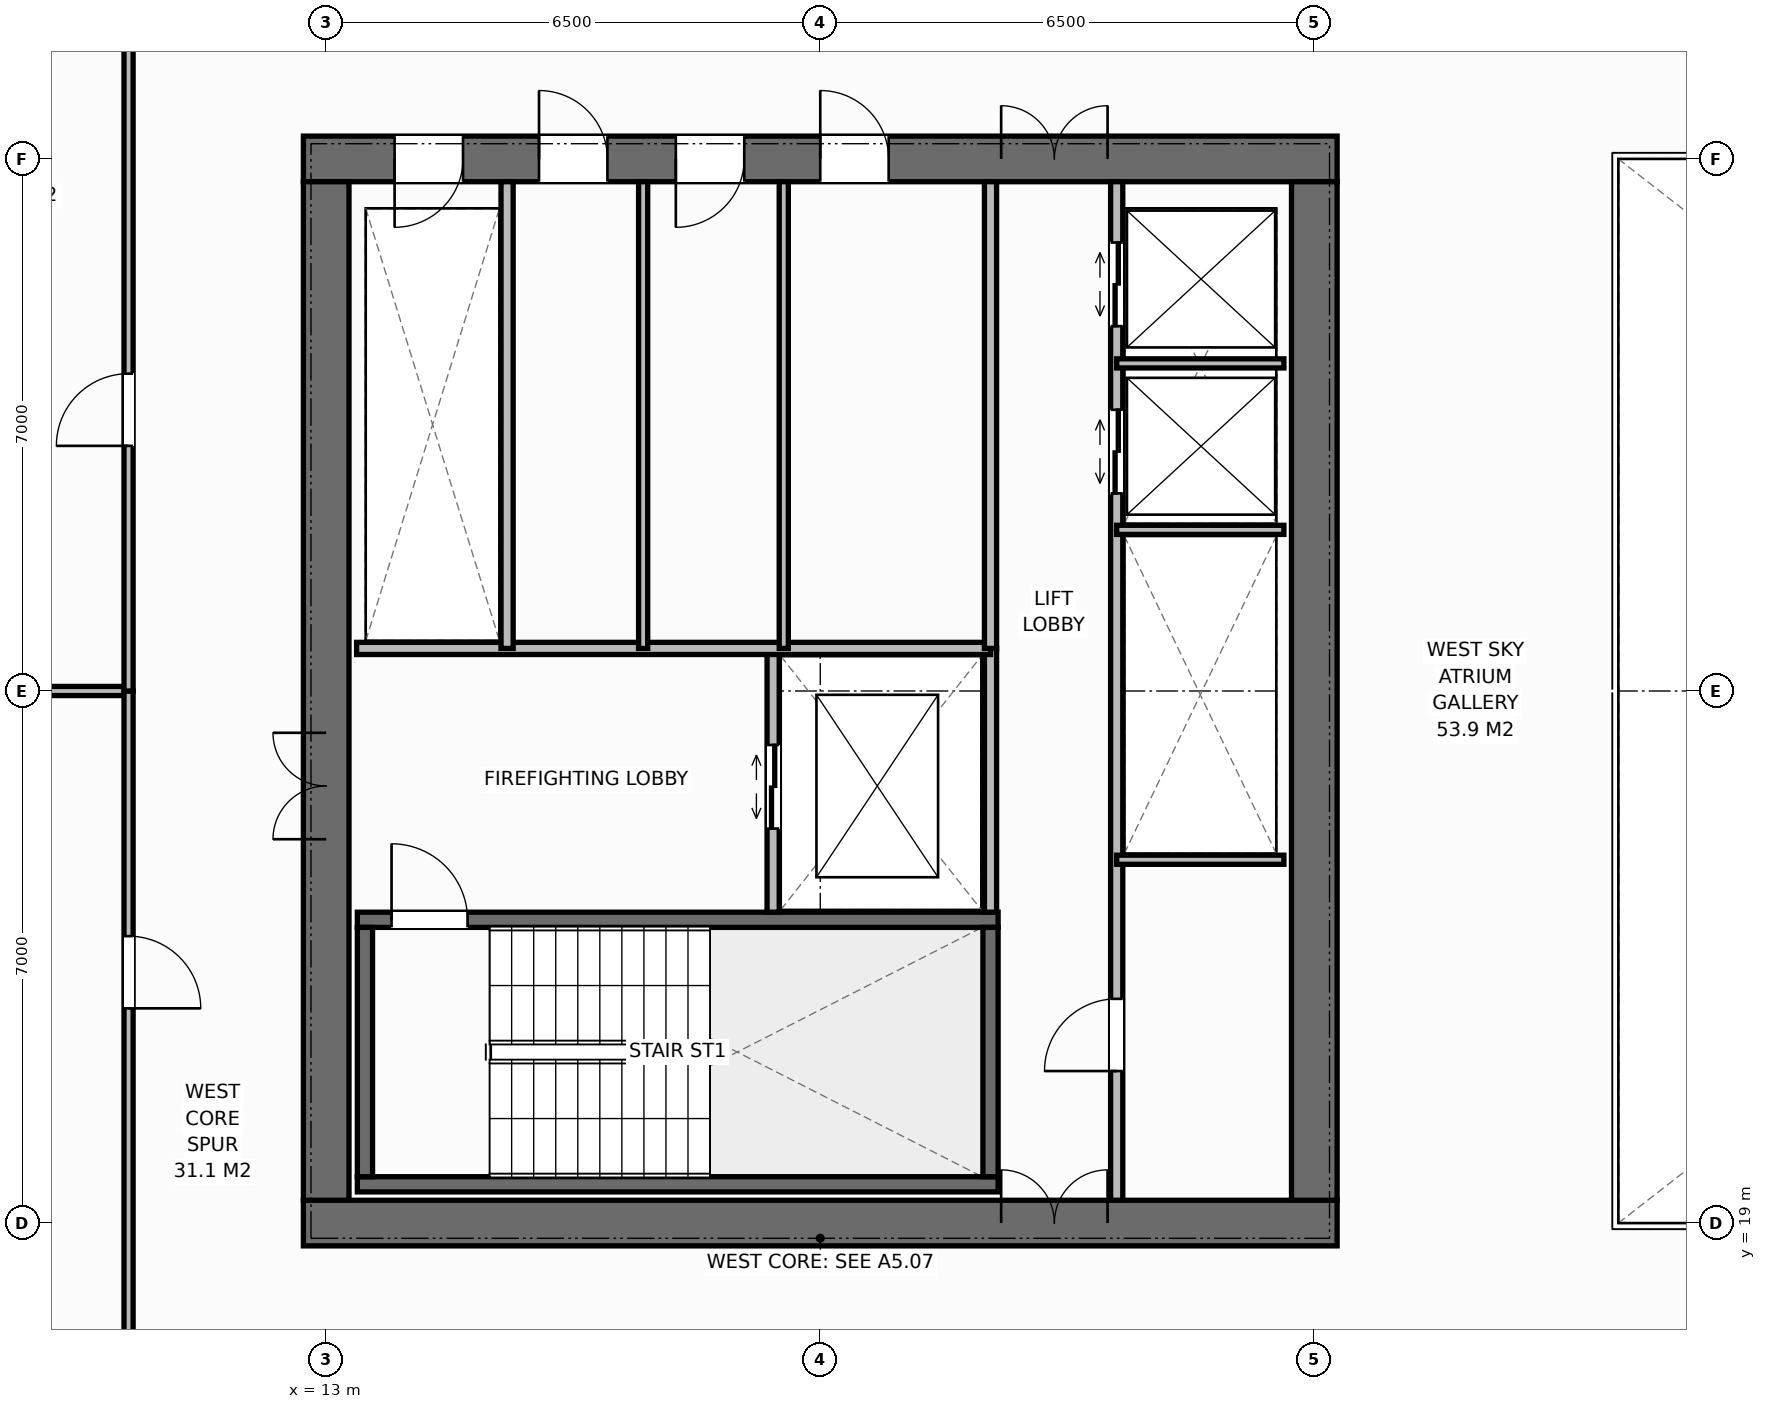
"""IFC4 building model, lengths in metres.
Left out: names, types, materials, properties, quantities, classifications, styles, units other than length and angle.
Written with IfcOpenShell. Run it as: python <this file> out.ifc"""

import sys

from ifc_helpers import new_model, si_unit, direction, frame, frame_2d, origin, place, context, subcontext, project, spatial, rectangle, extrude, element, fill, save


model = new_model("IFC4")
c1 = context("Model", 3, precision=1e-05, world=origin(), true_north=direction((0.0, 1.0)))
c2 = subcontext(c1, "Body", "Model", "MODEL_VIEW")
j1 = project(units=[si_unit("LENGTHUNIT", "METRE"), si_unit("PLANEANGLEUNIT", "RADIAN")], contexts=[c1])
p1 = place(None, origin())
s1 = spatial("IfcSite", under=j1, at=p1, CompositionType="ELEMENT")
p2 = place(p1, origin())
s2 = spatial("IfcBuilding", under=s1, at=p2, CompositionType="ELEMENT")
p3 = place(p2, frame((0.0, 0.0, 148.0)))
s3 = spatial("IfcBuildingStorey", under=s2, at=p3, CompositionType="ELEMENT", Elevation=148.0)
p4 = place(p3, frame((12.7, 19.0, 0.0), z_axis=(0.0, 0.0, 1.0), x_axis=(1.0, 0.0, 0.0)))
e1 = element("IfcWall", 1, at=p4, inside=s3, PredefinedType="SHEAR", context=c2, shape_type="SweptSolid", body=[
    extrude(rectangle(XDim=13.6, YDim=0.6, at=frame_2d((6.8, 0.0))), origin(), (0.0, 0.0, 1.0), 3.8),
])
p5 = place(p4, frame((9.18, 0.0, 0.0)))
e2 = element("IfcOpeningElement", 2, at=p5, cuts=e1, PredefinedType="OPENING", context=c2, shape_type="SweptSolid", body=[
    extrude(rectangle(XDim=1.4, YDim=2.2, at=frame_2d((0.7, 1.1))), frame((0.0, 0.31, 0.0), z_axis=(0.0, -1.0, 0.0), x_axis=(1.0, 0.0, 0.0)), (0.0, 0.0, 1.0), 0.62),
])
p6 = place(p3, frame((12.7, 33.0, 0.0), z_axis=(0.0, 0.0, 1.0), x_axis=(1.0, 0.0, 0.0)))
e3 = element("IfcWall", 3, at=p6, inside=s3, PredefinedType="SHEAR", context=c2, shape_type="SweptSolid", body=[
    extrude(rectangle(XDim=13.6, YDim=0.6, at=frame_2d((6.8, 0.0))), origin(), (0.0, 0.0, 1.0), 3.8),
])
p7 = place(p6, frame((1.2, 0.0, 0.0)))
e4 = element("IfcOpeningElement", 4, at=p7, cuts=e3, PredefinedType="OPENING", context=c2, shape_type="SweptSolid", body=[
    extrude(rectangle(XDim=0.9, YDim=2.15, at=frame_2d((0.45, 1.075))), frame((0.0, 0.31, 0.0), z_axis=(0.0, -1.0, 0.0), x_axis=(1.0, 0.0, 0.0)), (0.0, 0.0, 1.0), 0.62),
])
p8 = place(p6, frame((3.1, 0.0, 0.0)))
e5 = element("IfcOpeningElement", 5, at=p8, cuts=e3, PredefinedType="OPENING", context=c2, shape_type="SweptSolid", body=[
    extrude(rectangle(XDim=0.9, YDim=2.15, at=frame_2d((0.45, 1.075))), frame((0.0, 0.31, 0.0), z_axis=(0.0, -1.0, 0.0), x_axis=(1.0, 0.0, 0.0)), (0.0, 0.0, 1.0), 0.62),
])
p9 = place(p6, frame((4.9, 0.0, 0.0)))
e6 = element("IfcOpeningElement", 6, at=p9, cuts=e3, PredefinedType="OPENING", context=c2, shape_type="SweptSolid", body=[
    extrude(rectangle(XDim=0.9, YDim=2.15, at=frame_2d((0.45, 1.075))), frame((0.0, 0.31, 0.0), z_axis=(0.0, -1.0, 0.0), x_axis=(1.0, 0.0, 0.0)), (0.0, 0.0, 1.0), 0.62),
])
p10 = place(p6, frame((6.8, 0.0, 0.0)))
e7 = element("IfcOpeningElement", 7, at=p10, cuts=e3, PredefinedType="OPENING", context=c2, shape_type="SweptSolid", body=[
    extrude(rectangle(XDim=0.9, YDim=2.15, at=frame_2d((0.45, 1.075))), frame((0.0, 0.31, 0.0), z_axis=(0.0, -1.0, 0.0), x_axis=(1.0, 0.0, 0.0)), (0.0, 0.0, 1.0), 0.62),
])
p11 = place(p6, frame((9.18, 0.0, 0.0)))
e8 = element("IfcOpeningElement", 8, at=p11, cuts=e3, PredefinedType="OPENING", context=c2, shape_type="SweptSolid", body=[
    extrude(rectangle(XDim=1.4, YDim=2.2, at=frame_2d((0.7, 1.1))), frame((0.0, 0.31, 0.0), z_axis=(0.0, -1.0, 0.0), x_axis=(1.0, 0.0, 0.0)), (0.0, 0.0, 1.0), 0.62),
])
p12 = place(p3, frame((13.0, 19.3, 0.0), z_axis=(0.0, 0.0, 1.0), x_axis=(0.0, 1.0, 0.0)))
e9 = element("IfcWall", 9, at=p12, inside=s3, PredefinedType="SHEAR", context=c2, shape_type="SweptSolid", body=[
    extrude(rectangle(XDim=13.4, YDim=0.6, at=frame_2d((6.7, 0.0))), origin(), (0.0, 0.0, 1.0), 3.8),
])
p13 = place(p12, frame((4.75, 0.0, 0.0)))
e10 = element("IfcOpeningElement", 10, at=p13, cuts=e9, PredefinedType="OPENING", context=c2, shape_type="SweptSolid", body=[
    extrude(rectangle(XDim=1.4, YDim=2.2, at=frame_2d((0.7, 1.1))), frame((0.0, 0.31, 0.0), z_axis=(0.0, -1.0, 0.0), x_axis=(1.0, 0.0, 0.0)), (0.0, 0.0, 1.0), 0.62),
])
p14 = place(p3, frame((26.0, 19.3, 0.0), z_axis=(0.0, 0.0, 1.0), x_axis=(0.0, 1.0, 0.0)))
e11 = element("IfcWall", 11, at=p14, inside=s3, PredefinedType="SHEAR", context=c2, shape_type="SweptSolid", body=[
    extrude(rectangle(XDim=13.4, YDim=0.6, at=frame_2d((6.7, 0.0))), origin(), (0.0, 0.0, 1.0), 3.8),
])
p15 = place(p3, frame((13.41, 19.51, 0.0), z_axis=(0.0, 0.0, 1.0), x_axis=(1.0, 0.0, 0.0)))
e12 = element("IfcWall", 12, at=p15, inside=s3, PredefinedType="SHEAR", context=c2, shape_type="SweptSolid", body=[
    extrude(rectangle(XDim=8.43, YDim=0.2, at=frame_2d((4.215, 0.0))), origin(), (0.0, 0.0, 1.0), 3.8),
])
p16 = place(p3, frame((13.41, 22.99, 0.0), z_axis=(0.0, 0.0, 1.0), x_axis=(1.0, 0.0, 0.0)))
e13 = element("IfcWall", 13, at=p16, inside=s3, PredefinedType="SHEAR", context=c2, shape_type="SweptSolid", body=[
    extrude(rectangle(XDim=8.43, YDim=0.2, at=frame_2d((4.215, 0.0))), origin(), (0.0, 0.0, 1.0), 3.8),
])
p17 = place(p16, frame((0.45, 0.0, 0.0)))
e14 = element("IfcOpeningElement", 14, at=p17, cuts=e13, PredefinedType="OPENING", context=c2, shape_type="SweptSolid", body=[
    extrude(rectangle(XDim=1.0, YDim=2.15, at=frame_2d((0.5, 1.075))), frame((0.0, 0.11, 0.0), z_axis=(0.0, -1.0, 0.0), x_axis=(1.0, 0.0, 0.0)), (0.0, 0.0, 1.0), 0.22),
])
for number, where, z_axis, x_axis in (
    (15, (13.51, 19.61, 0.0), (0.0, 0.0, 1.0), (0.0, 1.0, 0.0)),
    (16, (21.74, 19.61, 0.0), (0.0, 0.0, 1.0), (0.0, 1.0, 0.0)),
):
    element("IfcWall", number, at=place(p3, frame(where, z_axis=z_axis, x_axis=x_axis)), inside=s3, PredefinedType="SHEAR", context=c2, shape_type="SweptSolid", body=[
        extrude(rectangle(XDim=3.28, YDim=0.2, at=frame_2d((1.64, 0.0))), origin(), (0.0, 0.0, 1.0), 3.8),
    ])
p18 = place(p3, frame((21.74, 23.09, 0.0), z_axis=(0.0, 0.0, 1.0), x_axis=(0.0, 1.0, 0.0)))
e17 = element("IfcWall", 17, at=p18, inside=s3, PredefinedType="STANDARD", context=c2, shape_type="SweptSolid", body=[
    extrude(rectangle(XDim=3.47, YDim=0.16, at=frame_2d((1.735, 0.0))), origin(), (0.0, 0.0, 1.0), 3.572),
])
p19 = place(p3, frame((18.88, 23.09, 0.0), z_axis=(0.0, 0.0, 1.0), x_axis=(0.0, 1.0, 0.0)))
e18 = element("IfcWall", 18, at=p19, inside=s3, PredefinedType="STANDARD", context=c2, shape_type="SweptSolid", body=[
    extrude(rectangle(XDim=3.47, YDim=0.16, at=frame_2d((1.735, 0.0))), origin(), (0.0, 0.0, 1.0), 3.572),
])
p20 = place(p19, frame((1.1, 0.0, 0.0)))
e19 = element("IfcOpeningElement", 19, at=p20, cuts=e18, PredefinedType="OPENING", context=c2, shape_type="SweptSolid", body=[
    extrude(rectangle(XDim=1.1, YDim=2.2, at=frame_2d((0.55, 1.1))), frame((0.0, 0.09, 0.0), z_axis=(0.0, -1.0, 0.0), x_axis=(1.0, 0.0, 0.0)), (0.0, 0.0, 1.0), 0.18),
])
p21 = place(p3, frame((13.4, 26.56, 0.0), z_axis=(0.0, 0.0, 1.0), x_axis=(1.0, 0.0, 0.0)))
e20 = element("IfcWall", 20, at=p21, inside=s3, PredefinedType="STANDARD", context=c2, shape_type="SweptSolid", body=[
    extrude(rectangle(XDim=8.34, YDim=0.16, at=frame_2d((4.17, 0.0))), origin(), (0.0, 0.0, 1.0), 3.572),
])
p22 = place(p3, frame((15.38, 26.56, 0.0), z_axis=(0.0, 0.0, 1.0), x_axis=(0.0, 1.0, 0.0)))
e21 = element("IfcWall", 21, at=p22, inside=s3, PredefinedType="STANDARD", context=c2, shape_type="SweptSolid", body=[
    extrude(rectangle(XDim=6.14, YDim=0.16, at=frame_2d((3.07, 0.0))), origin(), (0.0, 0.0, 1.0), 3.572),
])
for number, where, z_axis, x_axis in (
    (22, (17.17, 26.56, 0.0), (0.0, 0.0, 1.0), (0.0, 1.0, 0.0)),
    (23, (19.02, 26.56, 0.0), (0.0, 0.0, 1.0), (0.0, 1.0, 0.0)),
):
    element("IfcWall", number, at=place(p3, frame(where, z_axis=z_axis, x_axis=x_axis)), inside=s3, PredefinedType="PARTITIONING", context=c2, shape_type="SweptSolid", body=[
        extrude(rectangle(XDim=6.14, YDim=0.12, at=frame_2d((3.07, 0.0))), origin(), (0.0, 0.0, 1.0), 3.572),
    ])
p23 = place(p3, frame((21.74, 26.56, 0.0), z_axis=(0.0, 0.0, 1.0), x_axis=(0.0, 1.0, 0.0)))
e24 = element("IfcWall", 24, at=p23, inside=s3, PredefinedType="STANDARD", context=c2, shape_type="SweptSolid", body=[
    extrude(rectangle(XDim=6.14, YDim=0.16, at=frame_2d((3.07, 0.0))), origin(), (0.0, 0.0, 1.0), 3.572),
])
p24 = place(p3, frame((23.4, 19.3, 0.0), z_axis=(0.0, 0.0, 1.0), x_axis=(0.0, 1.0, 0.0)))
e25 = element("IfcWall", 25, at=p24, inside=s3, PredefinedType="STANDARD", context=c2, shape_type="SweptSolid", body=[
    extrude(rectangle(XDim=13.4, YDim=0.16, at=frame_2d((6.7, 0.0))), origin(), (0.0, 0.0, 1.0), 3.572),
])
p25 = place(p24, frame((1.7, 0.0, 0.0)))
e26 = element("IfcOpeningElement", 26, at=p25, cuts=e25, PredefinedType="OPENING", context=c2, shape_type="SweptSolid", body=[
    extrude(rectangle(XDim=0.95, YDim=2.15, at=frame_2d((0.475, 1.075))), frame((0.0, 0.09, 0.0), z_axis=(0.0, -1.0, 0.0), x_axis=(1.0, 0.0, 0.0)), (0.0, 0.0, 1.0), 0.18),
])
p26 = place(p24, frame((9.3, 0.0, 0.0)))
e27 = element("IfcOpeningElement", 27, at=p26, cuts=e25, PredefinedType="OPENING", context=c2, shape_type="SweptSolid", body=[
    extrude(rectangle(XDim=1.1, YDim=2.2, at=frame_2d((0.55, 1.1))), frame((0.0, 0.09, 0.0), z_axis=(0.0, -1.0, 0.0), x_axis=(1.0, 0.0, 0.0)), (0.0, 0.0, 1.0), 0.18),
])
p27 = place(p24, frame((11.5, 0.0, 0.0)))
e28 = element("IfcOpeningElement", 28, at=p27, cuts=e25, PredefinedType="OPENING", context=c2, shape_type="SweptSolid", body=[
    extrude(rectangle(XDim=1.1, YDim=2.2, at=frame_2d((0.55, 1.1))), frame((0.0, 0.09, 0.0), z_axis=(0.0, -1.0, 0.0), x_axis=(1.0, 0.0, 0.0)), (0.0, 0.0, 1.0), 0.18),
])
for number, where, z_axis, x_axis in (
    (29, (23.4, 23.78, 0.0), (0.0, 0.0, 1.0), (1.0, 0.0, 0.0)),
    (30, (23.4, 28.12, 0.0), (0.0, 0.0, 1.0), (1.0, 0.0, 0.0)),
    (31, (23.4, 30.31, 0.0), (0.0, 0.0, 1.0), (1.0, 0.0, 0.0)),
):
    element("IfcWall", number, at=place(p3, frame(where, z_axis=z_axis, x_axis=x_axis)), inside=s3, PredefinedType="PARTITIONING", context=c2, shape_type="SweptSolid", body=[
        extrude(rectangle(XDim=2.2, YDim=0.12, at=frame_2d((1.1, 0.0))), origin(), (0.0, 0.0, 1.0), 3.572),
    ])
p28 = place(p3, frame((3.82, 26.0, 0.0), z_axis=(0.0, 0.0, 1.0), x_axis=(1.0, 0.0, 0.0)))
e32 = element("IfcWall", 32, at=p28, inside=s3, PredefinedType="PARTITIONING", context=c2, shape_type="SweptSolid", body=[
    extrude(rectangle(XDim=6.58, YDim=0.12, at=frame_2d((3.29, 0.0))), origin(), (0.0, 0.0, 1.0), 3.572),
])
p29 = place(p3, frame((10.4, 16.5, 0.0), z_axis=(0.0, 0.0, 1.0), x_axis=(0.0, 1.0, 0.0)))
e33 = element("IfcWall", 33, at=p29, inside=s3, PredefinedType="PARTITIONING", context=c2, shape_type="SweptSolid", body=[
    extrude(rectangle(XDim=9.5, YDim=0.12, at=frame_2d((4.75, 0.0))), origin(), (0.0, 0.0, 1.0), 3.572),
])
p30 = place(p29, frame((5.325, 0.0, 0.0)))
e34 = element("IfcOpeningElement", 34, at=p30, cuts=e33, PredefinedType="OPENING", context=c2, shape_type="SweptSolid", body=[
    extrude(rectangle(XDim=0.95, YDim=2.15, at=frame_2d((0.475, 1.075))), frame((0.0, 0.07, 0.0), z_axis=(0.0, -1.0, 0.0), x_axis=(1.0, 0.0, 0.0)), (0.0, 0.0, 1.0), 0.14),
])
p31 = place(p3, frame((10.4, 26.0, 0.0), z_axis=(0.0, 0.0, 1.0), x_axis=(0.0, 1.0, 0.0)))
e35 = element("IfcWall", 35, at=p31, inside=s3, PredefinedType="PARTITIONING", context=c2, shape_type="SweptSolid", body=[
    extrude(rectangle(XDim=9.5, YDim=0.12, at=frame_2d((4.75, 0.0))), origin(), (0.0, 0.0, 1.0), 3.572),
])
p32 = place(p31, frame((3.225, 0.0, 0.0)))
e36 = element("IfcOpeningElement", 36, at=p32, cuts=e35, PredefinedType="OPENING", context=c2, shape_type="SweptSolid", body=[
    extrude(rectangle(XDim=0.95, YDim=2.15, at=frame_2d((0.475, 1.075))), frame((0.0, 0.07, 0.0), z_axis=(0.0, -1.0, 0.0), x_axis=(1.0, 0.0, 0.0)), (0.0, 0.0, 1.0), 0.14),
])
p33 = place(p17, origin())
e37 = element("IfcDoor", 37, at=p33, inside=s3, OperationType="SINGLE_SWING_LEFT", PredefinedType="DOOR", context=c2, shape_type="SweptSolid", body=[
    extrude(rectangle(XDim=1.0, YDim=2.15, at=frame_2d((0.5, 1.075))), frame((0.0, 0.025, 0.0), z_axis=(0.0, -1.0, 0.0), x_axis=(1.0, 0.0, 0.0)), (0.0, 0.0, 1.0), 0.05),
])
fill(e14, e37)
p34 = place(p13, origin())
e38 = element("IfcDoor", 38, at=p34, inside=s3, OperationType="DOUBLE_DOOR_SINGLE_SWING", PredefinedType="DOOR", context=c2, shape_type="SweptSolid", body=[
    extrude(rectangle(XDim=1.4, YDim=2.2, at=frame_2d((0.7, 1.1))), frame((0.0, 0.025, 0.0), z_axis=(0.0, -1.0, 0.0), x_axis=(1.0, 0.0, 0.0)), (0.0, 0.0, 1.0), 0.05),
])
fill(e10, e38)
p35 = place(p20, origin())
e39 = element("IfcDoor", 39, at=p35, inside=s3, OperationType="DOUBLE_DOOR_SLIDING", PredefinedType="DOOR", context=c2, shape_type="SweptSolid", body=[
    extrude(rectangle(XDim=1.1, YDim=2.2, at=frame_2d((0.55, 1.1))), frame((0.0, 0.025, 0.0), z_axis=(0.0, -1.0, 0.0), x_axis=(1.0, 0.0, 0.0)), (0.0, 0.0, 1.0), 0.05),
])
fill(e19, e39)
p36 = place(p7, origin())
e40 = element("IfcDoor", 40, at=p36, inside=s3, OperationType="SINGLE_SWING_RIGHT", PredefinedType="DOOR", context=c2, shape_type="SweptSolid", body=[
    extrude(rectangle(XDim=0.9, YDim=2.15, at=frame_2d((0.45, 1.075))), frame((0.0, -0.025, 0.0), z_axis=(0.0, -1.0, 0.0), x_axis=(1.0, 0.0, 0.0)), (0.0, 0.0, 1.0), 0.05),
])
fill(e4, e40)
p37 = place(p8, origin())
e41 = element("IfcDoor", 41, at=p37, inside=s3, OperationType="SINGLE_SWING_LEFT", PredefinedType="DOOR", context=c2, shape_type="SweptSolid", body=[
    extrude(rectangle(XDim=0.9, YDim=2.15, at=frame_2d((0.45, 1.075))), frame((0.0, -0.025, 0.0), z_axis=(0.0, -1.0, 0.0), x_axis=(1.0, 0.0, 0.0)), (0.0, 0.0, 1.0), 0.05),
])
fill(e5, e41)
p38 = place(p9, origin())
e42 = element("IfcDoor", 42, at=p38, inside=s3, OperationType="SINGLE_SWING_RIGHT", PredefinedType="DOOR", context=c2, shape_type="SweptSolid", body=[
    extrude(rectangle(XDim=0.9, YDim=2.15, at=frame_2d((0.45, 1.075))), frame((0.0, -0.025, 0.0), z_axis=(0.0, -1.0, 0.0), x_axis=(1.0, 0.0, 0.0)), (0.0, 0.0, 1.0), 0.05),
])
fill(e6, e42)
p39 = place(p10, origin())
e43 = element("IfcDoor", 43, at=p39, inside=s3, OperationType="SINGLE_SWING_LEFT", PredefinedType="DOOR", context=c2, shape_type="SweptSolid", body=[
    extrude(rectangle(XDim=0.9, YDim=2.15, at=frame_2d((0.45, 1.075))), frame((0.0, -0.025, 0.0), z_axis=(0.0, -1.0, 0.0), x_axis=(1.0, 0.0, 0.0)), (0.0, 0.0, 1.0), 0.05),
])
fill(e7, e43)
p40 = place(p5, origin())
e44 = element("IfcDoor", 44, at=p40, inside=s3, OperationType="DOUBLE_DOOR_SINGLE_SWING", PredefinedType="DOOR", context=c2, shape_type="SweptSolid", body=[
    extrude(rectangle(XDim=1.4, YDim=2.2, at=frame_2d((0.7, 1.1))), frame((0.0, 0.075, 0.0), z_axis=(0.0, -1.0, 0.0), x_axis=(1.0, 0.0, 0.0)), (0.0, 0.0, 1.0), 0.05),
])
fill(e2, e44)
p41 = place(p11, origin())
e45 = element("IfcDoor", 45, at=p41, inside=s3, OperationType="DOUBLE_DOOR_SINGLE_SWING", PredefinedType="DOOR", context=c2, shape_type="SweptSolid", body=[
    extrude(rectangle(XDim=1.4, YDim=2.2, at=frame_2d((0.7, 1.1))), frame((0.0, -0.025, 0.0), z_axis=(0.0, -1.0, 0.0), x_axis=(1.0, 0.0, 0.0)), (0.0, 0.0, 1.0), 0.05),
])
fill(e8, e45)
p42 = place(p25, origin())
e46 = element("IfcDoor", 46, at=p42, inside=s3, OperationType="SINGLE_SWING_LEFT", PredefinedType="DOOR", context=c2, shape_type="SweptSolid", body=[
    extrude(rectangle(XDim=0.95, YDim=2.15, at=frame_2d((0.475, 1.075))), frame((0.0, 0.025, 0.0), z_axis=(0.0, -1.0, 0.0), x_axis=(1.0, 0.0, 0.0)), (0.0, 0.0, 1.0), 0.05),
])
fill(e26, e46)
p43 = place(p26, origin())
e47 = element("IfcDoor", 47, at=p43, inside=s3, OperationType="DOUBLE_DOOR_SLIDING", PredefinedType="DOOR", context=c2, shape_type="SweptSolid", body=[
    extrude(rectangle(XDim=1.1, YDim=2.2, at=frame_2d((0.55, 1.1))), frame((0.0, 0.025, 0.0), z_axis=(0.0, -1.0, 0.0), x_axis=(1.0, 0.0, 0.0)), (0.0, 0.0, 1.0), 0.05),
])
fill(e27, e47)
p44 = place(p27, origin())
e48 = element("IfcDoor", 48, at=p44, inside=s3, OperationType="DOUBLE_DOOR_SLIDING", PredefinedType="DOOR", context=c2, shape_type="SweptSolid", body=[
    extrude(rectangle(XDim=1.1, YDim=2.2, at=frame_2d((0.55, 1.1))), frame((0.0, 0.025, 0.0), z_axis=(0.0, -1.0, 0.0), x_axis=(1.0, 0.0, 0.0)), (0.0, 0.0, 1.0), 0.05),
])
fill(e28, e48)
p45 = place(p30, origin())
e49 = element("IfcDoor", 49, at=p45, inside=s3, OperationType="SINGLE_SWING_RIGHT", PredefinedType="DOOR", context=c2, shape_type="SweptSolid", body=[
    extrude(rectangle(XDim=0.95, YDim=2.15, at=frame_2d((0.475, 1.075))), frame((0.0, 0.025, 0.0), z_axis=(0.0, -1.0, 0.0), x_axis=(1.0, 0.0, 0.0)), (0.0, 0.0, 1.0), 0.05),
])
fill(e34, e49)
p46 = place(p32, origin())
e50 = element("IfcDoor", 50, at=p46, inside=s3, OperationType="SINGLE_SWING_LEFT", PredefinedType="DOOR", context=c2, shape_type="SweptSolid", body=[
    extrude(rectangle(XDim=0.95, YDim=2.15, at=frame_2d((0.475, 1.075))), frame((0.0, 0.025, 0.0), z_axis=(0.0, -1.0, 0.0), x_axis=(1.0, 0.0, 0.0)), (0.0, 0.0, 1.0), 0.05),
])
fill(e36, e50)
save(model, sys.argv[1])
